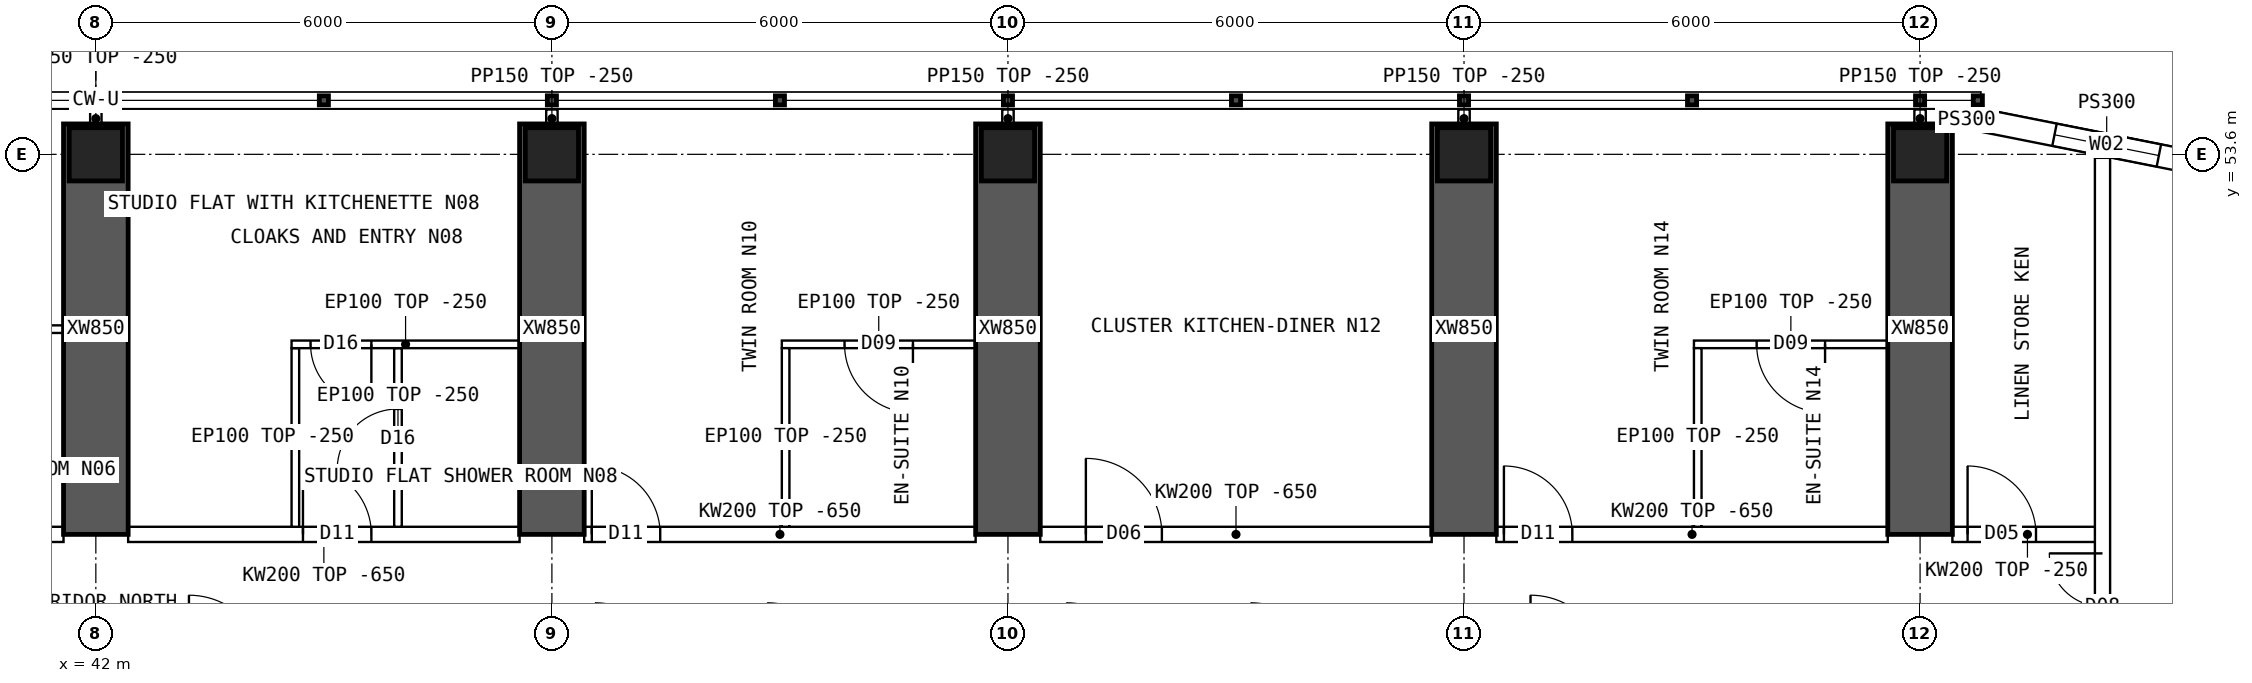
"""IFC4 building model, lengths in metres.
Left out: names, types, materials, properties, quantities, classifications, styles, units other than length and angle.
Written with IfcOpenShell. Run it as: python <this file> out.ifc"""

import sys

from ifc_helpers import new_model, si_unit, direction, frame, frame_2d, origin, origin_2d, place, context, subcontext, project, spatial, polyline, rectangle, hollow_rectangle, outline, extrude, element, fill, save


model = new_model("IFC4")
c1 = context("Model", 3, precision=1e-05, world=origin(), true_north=direction((0.0, 1.0)))
c2 = subcontext(c1, "Body", "Model", "MODEL_VIEW")
j1 = project(units=[si_unit("LENGTHUNIT", "METRE"), si_unit("PLANEANGLEUNIT", "RADIAN")], contexts=[c1])
p1 = place(None, origin())
s1 = spatial("IfcSite", under=j1, at=p1, CompositionType="ELEMENT")
p2 = place(p1, origin())
s2 = spatial("IfcBuilding", under=s1, at=p2, CompositionType="ELEMENT")
p3 = place(p2, frame((0.0, 0.0, 148.6)))
s3 = spatial("IfcBuildingStorey", under=s2, at=p3, CompositionType="ELEMENT", Elevation=148.6)
for number, where, z_axis, x_axis in (
    (1, (42.0, 53.6, 0.0), (0.0, 0.0, 1.0), (1.0, 0.0, 0.0)),
    (2, (48.0, 53.6, 0.0), (0.0, 0.0, 1.0), (1.0, 0.0, 0.0)),
    (3, (54.0, 53.6, 0.0), (0.0, 0.0, 1.0), (1.0, 0.0, 0.0)),
    (4, (60.0, 53.6, 0.0), (0.0, 0.0, 1.0), (1.0, 0.0, 0.0)),
    (5, (66.0, 53.6, 0.0), (0.0, 0.0, 1.0), (1.0, 0.0, 0.0)),
):
    element("IfcColumn", number, at=place(p3, frame(where, z_axis=z_axis, x_axis=x_axis)), inside=s3, PredefinedType="COLUMN", context=c2, shape_type="SweptSolid", body=[
        extrude(hollow_rectangle(XDim=0.7, YDim=0.7, WallThickness=0.07, at=origin_2d()), origin(), (0.0, 0.0, 1.0), 3.75),
    ])
for number, where, z_axis, x_axis in (
    (6, (42.0, 48.6, 0.0), (0.0, 0.0, 1.0), (0.0, 1.0, 0.0)),
    (7, (48.0, 48.6, 0.0), (0.0, 0.0, 1.0), (0.0, 1.0, 0.0)),
    (8, (54.0, 48.6, 0.0), (0.0, 0.0, 1.0), (0.0, 1.0, 0.0)),
    (9, (60.0, 48.6, 0.0), (0.0, 0.0, 1.0), (0.0, 1.0, 0.0)),
    (10, (66.0, 48.6, 0.0), (0.0, 0.0, 1.0), (0.0, 1.0, 0.0)),
):
    element("IfcWall", number, at=place(p3, frame(where, z_axis=z_axis, x_axis=x_axis)), inside=s3, PredefinedType="SHEAR", context=c2, shape_type="SweptSolid", body=[
        extrude(rectangle(XDim=5.4, YDim=0.85, at=frame_2d((2.7, 0.0))), origin(), (0.0, 0.0, 1.0), 3.75),
    ])
p4 = place(p3, frame((70.11, 53.392, 0.0), z_axis=(0.0, 0.0, 1.0), x_axis=(-0.98078325777, 0.195100490205, 0.0)))
e11 = element("IfcWall", 11, at=p4, inside=s3, PredefinedType="SOLIDWALL", context=c2, shape_type="SweptSolid", body=[
    extrude(outline(polyline([(-0.03, -0.15), (3.405, -0.15), (3.345, 0.15), (0.03, 0.15), (-0.03, -0.15)])), origin(), (0.0, 0.0, 1.0), 3.5),
])
p5 = place(p4, frame((0.988, 0.0, 0.9)))
e12 = element("IfcOpeningElement", 12, at=p5, cuts=e11, PredefinedType="OPENING", context=c2, shape_type="SweptSolid", body=[
    extrude(rectangle(XDim=1.4, YDim=1.8, at=frame_2d((0.7, 0.9))), frame((0.0, 0.16, 0.0), z_axis=(0.0, -1.0, 0.0), x_axis=(1.0, 0.0, 0.0)), (0.0, 0.0, 1.0), 0.32),
])
p6 = place(p3, frame((66.8, 54.05, 0.0), z_axis=(0.0, 0.0, 1.0), x_axis=(-1.0, 0.0, 0.0)))
e13 = element("IfcWall", 13, at=p6, inside=s3, PredefinedType="SOLIDWALL", context=c2, shape_type="SweptSolid", body=[
    extrude(rectangle(XDim=0.375, YDim=0.3, at=frame_2d((0.188, 0.0))), origin(), (0.0, 0.0, 1.0), 3.5),
])
p7 = place(p3, frame((36.425, 48.6, 0.0), z_axis=(0.0, 0.0, 1.0), x_axis=(1.0, 0.0, 0.0)))
e14 = element("IfcWall", 14, at=p7, inside=s3, PredefinedType="SOLIDWALL", context=c2, shape_type="SweptSolid", body=[
    extrude(outline(polyline([(0.0, 0.0), (5.15, 0.0), (5.15, 3.1), (0.0, 3.1), (0.0, 0.0)])), frame((0.0, 0.1, 0.0), z_axis=(0.0, -1.0, 0.0), x_axis=(1.0, 0.0, 0.0)), (0.0, 0.0, 1.0), 0.2),
])
p8 = place(p7, frame((0.3, 0.0, 0.0)))
e15 = element("IfcOpeningElement", 15, at=p8, cuts=e14, PredefinedType="OPENING", context=c2, shape_type="SweptSolid", body=[
    extrude(rectangle(XDim=1.0, YDim=2.1, at=frame_2d((0.5, 1.05))), frame((0.0, 0.11, 0.0), z_axis=(0.0, -1.0, 0.0), x_axis=(1.0, 0.0, 0.0)), (0.0, 0.0, 1.0), 0.22),
])
p9 = place(p3, frame((42.425, 48.6, 0.0), z_axis=(0.0, 0.0, 1.0), x_axis=(1.0, 0.0, 0.0)))
e16 = element("IfcWall", 16, at=p9, inside=s3, PredefinedType="SOLIDWALL", context=c2, shape_type="SweptSolid", body=[
    extrude(outline(polyline([(0.0, 0.0), (5.15, 0.0), (5.15, 3.1), (0.0, 3.1), (0.0, 0.0)])), frame((0.0, 0.1, 0.0), z_axis=(0.0, -1.0, 0.0), x_axis=(1.0, 0.0, 0.0)), (0.0, 0.0, 1.0), 0.2),
])
p10 = place(p9, frame((2.3, 0.0, 0.0)))
e17 = element("IfcOpeningElement", 17, at=p10, cuts=e16, PredefinedType="OPENING", context=c2, shape_type="SweptSolid", body=[
    extrude(rectangle(XDim=0.9, YDim=2.1, at=frame_2d((0.45, 1.05))), frame((0.0, 0.11, 0.0), z_axis=(0.0, -1.0, 0.0), x_axis=(1.0, 0.0, 0.0)), (0.0, 0.0, 1.0), 0.22),
])
p11 = place(p3, frame((48.425, 48.6, 0.0), z_axis=(0.0, 0.0, 1.0), x_axis=(1.0, 0.0, 0.0)))
e18 = element("IfcWall", 18, at=p11, inside=s3, PredefinedType="SOLIDWALL", context=c2, shape_type="SweptSolid", body=[
    extrude(outline(polyline([(0.0, 0.0), (5.15, 0.0), (5.15, 3.1), (0.0, 3.1), (0.0, 0.0)])), frame((0.0, 0.1, 0.0), z_axis=(0.0, -1.0, 0.0), x_axis=(1.0, 0.0, 0.0)), (0.0, 0.0, 1.0), 0.2),
])
p12 = place(p11, frame((0.1, 0.0, 0.0)))
e19 = element("IfcOpeningElement", 19, at=p12, cuts=e18, PredefinedType="OPENING", context=c2, shape_type="SweptSolid", body=[
    extrude(rectangle(XDim=0.9, YDim=2.1, at=frame_2d((0.45, 1.05))), frame((0.0, 0.11, 0.0), z_axis=(0.0, -1.0, 0.0), x_axis=(1.0, 0.0, 0.0)), (0.0, 0.0, 1.0), 0.22),
])
p13 = place(p3, frame((54.425, 48.6, 0.0), z_axis=(0.0, 0.0, 1.0), x_axis=(1.0, 0.0, 0.0)))
e20 = element("IfcWall", 20, at=p13, inside=s3, PredefinedType="SOLIDWALL", context=c2, shape_type="SweptSolid", body=[
    extrude(outline(polyline([(0.0, 0.0), (5.15, 0.0), (5.15, 3.1), (0.0, 3.1), (0.0, 0.0)])), frame((0.0, 0.1, 0.0), z_axis=(0.0, -1.0, 0.0), x_axis=(1.0, 0.0, 0.0)), (0.0, 0.0, 1.0), 0.2),
])
p14 = place(p13, frame((0.6, 0.0, 0.0)))
e21 = element("IfcOpeningElement", 21, at=p14, cuts=e20, PredefinedType="OPENING", context=c2, shape_type="SweptSolid", body=[
    extrude(rectangle(XDim=1.0, YDim=2.1, at=frame_2d((0.5, 1.05))), frame((0.0, 0.11, 0.0), z_axis=(0.0, -1.0, 0.0), x_axis=(1.0, 0.0, 0.0)), (0.0, 0.0, 1.0), 0.22),
])
p15 = place(p3, frame((60.425, 48.6, 0.0), z_axis=(0.0, 0.0, 1.0), x_axis=(1.0, 0.0, 0.0)))
e22 = element("IfcWall", 22, at=p15, inside=s3, PredefinedType="SOLIDWALL", context=c2, shape_type="SweptSolid", body=[
    extrude(outline(polyline([(0.0, 0.0), (5.15, 0.0), (5.15, 3.1), (0.0, 3.1), (0.0, 0.0)])), frame((0.0, 0.1, 0.0), z_axis=(0.0, -1.0, 0.0), x_axis=(1.0, 0.0, 0.0)), (0.0, 0.0, 1.0), 0.2),
])
p16 = place(p15, frame((0.1, 0.0, 0.0)))
e23 = element("IfcOpeningElement", 23, at=p16, cuts=e22, PredefinedType="OPENING", context=c2, shape_type="SweptSolid", body=[
    extrude(rectangle(XDim=0.9, YDim=2.1, at=frame_2d((0.45, 1.05))), frame((0.0, 0.11, 0.0), z_axis=(0.0, -1.0, 0.0), x_axis=(1.0, 0.0, 0.0)), (0.0, 0.0, 1.0), 0.22),
])
p17 = place(p3, frame((66.425, 48.6, 0.0), z_axis=(0.0, 0.0, 1.0), x_axis=(1.0, 0.0, 0.0)))
e24 = element("IfcWall", 24, at=p17, inside=s3, PredefinedType="SOLIDWALL", context=c2, shape_type="SweptSolid", body=[
    extrude(rectangle(XDim=1.975, YDim=0.2, at=frame_2d((0.987, 0.0))), origin(), (0.0, 0.0, 1.0), 3.5),
])
p18 = place(p17, frame((0.2, 0.0, 0.0)))
e25 = element("IfcOpeningElement", 25, at=p18, cuts=e24, PredefinedType="OPENING", context=c2, shape_type="SweptSolid", body=[
    extrude(rectangle(XDim=0.9, YDim=2.1, at=frame_2d((0.45, 1.05))), frame((0.0, 0.11, 0.0), z_axis=(0.0, -1.0, 0.0), x_axis=(1.0, 0.0, 0.0)), (0.0, 0.0, 1.0), 0.22),
])
p19 = place(p3, frame((38.925, 51.3, 0.0), z_axis=(0.0, 0.0, 1.0), x_axis=(1.0, 0.0, 0.0)))
e26 = element("IfcWall", 26, at=p19, inside=s3, PredefinedType="PARTITIONING", context=c2, shape_type="SweptSolid", body=[
    extrude(rectangle(XDim=2.65, YDim=0.1, at=frame_2d((1.325, 0.0))), origin(), (0.0, 0.0, 1.0), 3.5),
])
p20 = place(p3, frame((44.575, 51.1, 0.0), z_axis=(0.0, 0.0, 1.0), x_axis=(1.0, 0.0, 0.0)))
e27 = element("IfcWall", 27, at=p20, inside=s3, PredefinedType="PARTITIONING", context=c2, shape_type="SweptSolid", body=[
    extrude(rectangle(XDim=3.0, YDim=0.1, at=frame_2d((1.5, 0.0))), origin(), (0.0, 0.0, 1.0), 3.5),
])
p21 = place(p20, frame((0.25, 0.0, 0.0)))
e28 = element("IfcOpeningElement", 28, at=p21, cuts=e27, PredefinedType="OPENING", context=c2, shape_type="SweptSolid", body=[
    extrude(rectangle(XDim=0.8, YDim=2.1, at=frame_2d((0.4, 1.05))), frame((0.0, 0.06, 0.0), z_axis=(0.0, -1.0, 0.0), x_axis=(1.0, 0.0, 0.0)), (0.0, 0.0, 1.0), 0.12),
])
p22 = place(p3, frame((44.625, 51.05, 0.0), z_axis=(0.0, 0.0, 1.0), x_axis=(0.0, -1.0, 0.0)))
e29 = element("IfcWall", 29, at=p22, inside=s3, PredefinedType="PARTITIONING", context=c2, shape_type="SweptSolid", body=[
    extrude(outline(polyline([(0.0, 0.0), (2.35, 0.0), (2.35, 3.1), (2.302, 3.1), (2.3, 3.5), (0.0, 3.5), (0.0, 0.0)])), frame((0.0, 0.05, 0.0), z_axis=(0.0, -1.0, 0.0), x_axis=(1.0, 0.0, 0.0)), (0.0, 0.0, 1.0), 0.1),
])
p23 = place(p3, frame((45.975, 51.05, 0.0), z_axis=(0.0, 0.0, 1.0), x_axis=(0.0, -1.0, 0.0)))
e30 = element("IfcWall", 30, at=p23, inside=s3, PredefinedType="PARTITIONING", context=c2, shape_type="SweptSolid", body=[
    extrude(outline(polyline([(0.0, 0.0), (2.35, 0.0), (2.35, 3.1), (2.302, 3.1), (2.3, 3.5), (0.0, 3.5), (0.0, 0.0)])), frame((0.0, 0.05, 0.0), z_axis=(0.0, -1.0, 0.0), x_axis=(1.0, 0.0, 0.0)), (0.0, 0.0, 1.0), 0.1),
])
p24 = place(p23, frame((0.8, 0.0, 0.0)))
e31 = element("IfcOpeningElement", 31, at=p24, cuts=e30, PredefinedType="OPENING", context=c2, shape_type="SweptSolid", body=[
    extrude(rectangle(XDim=0.8, YDim=2.1, at=frame_2d((0.4, 1.05))), frame((0.0, 0.06, 0.0), z_axis=(0.0, -1.0, 0.0), x_axis=(1.0, 0.0, 0.0)), (0.0, 0.0, 1.0), 0.12),
])
p25 = place(p3, frame((51.025, 51.1, 0.0), z_axis=(0.0, 0.0, 1.0), x_axis=(1.0, 0.0, 0.0)))
e32 = element("IfcWall", 32, at=p25, inside=s3, PredefinedType="PARTITIONING", context=c2, shape_type="SweptSolid", body=[
    extrude(rectangle(XDim=2.55, YDim=0.1, at=frame_2d((1.275, 0.0))), origin(), (0.0, 0.0, 1.0), 3.5),
])
p26 = place(p25, frame((0.825, 0.0, 0.0)))
e33 = element("IfcOpeningElement", 33, at=p26, cuts=e32, PredefinedType="OPENING", context=c2, shape_type="SweptSolid", body=[
    extrude(rectangle(XDim=0.9, YDim=2.1, at=frame_2d((0.45, 1.05))), frame((0.0, 0.06, 0.0), z_axis=(0.0, -1.0, 0.0), x_axis=(1.0, 0.0, 0.0)), (0.0, 0.0, 1.0), 0.12),
])
p27 = place(p3, frame((51.075, 51.05, 0.0), z_axis=(0.0, 0.0, 1.0), x_axis=(0.0, -1.0, 0.0)))
e34 = element("IfcWall", 34, at=p27, inside=s3, PredefinedType="PARTITIONING", context=c2, shape_type="SweptSolid", body=[
    extrude(outline(polyline([(0.0, 0.0), (2.35, 0.0), (2.35, 3.1), (2.302, 3.1), (2.3, 3.5), (0.0, 3.5), (0.0, 0.0)])), frame((0.0, 0.05, 0.0), z_axis=(0.0, -1.0, 0.0), x_axis=(1.0, 0.0, 0.0)), (0.0, 0.0, 1.0), 0.1),
])
p28 = place(p3, frame((63.025, 51.1, 0.0), z_axis=(0.0, 0.0, 1.0), x_axis=(1.0, 0.0, 0.0)))
e35 = element("IfcWall", 35, at=p28, inside=s3, PredefinedType="PARTITIONING", context=c2, shape_type="SweptSolid", body=[
    extrude(rectangle(XDim=2.55, YDim=0.1, at=frame_2d((1.275, 0.0))), origin(), (0.0, 0.0, 1.0), 3.5),
])
p29 = place(p28, frame((0.825, 0.0, 0.0)))
e36 = element("IfcOpeningElement", 36, at=p29, cuts=e35, PredefinedType="OPENING", context=c2, shape_type="SweptSolid", body=[
    extrude(rectangle(XDim=0.9, YDim=2.1, at=frame_2d((0.45, 1.05))), frame((0.0, 0.06, 0.0), z_axis=(0.0, -1.0, 0.0), x_axis=(1.0, 0.0, 0.0)), (0.0, 0.0, 1.0), 0.12),
])
p30 = place(p3, frame((63.075, 51.05, 0.0), z_axis=(0.0, 0.0, 1.0), x_axis=(0.0, -1.0, 0.0)))
e37 = element("IfcWall", 37, at=p30, inside=s3, PredefinedType="PARTITIONING", context=c2, shape_type="SweptSolid", body=[
    extrude(outline(polyline([(0.0, 0.0), (2.35, 0.0), (2.35, 3.1), (2.302, 3.1), (2.3, 3.5), (0.0, 3.5), (0.0, 0.0)])), frame((0.0, 0.05, 0.0), z_axis=(0.0, -1.0, 0.0), x_axis=(1.0, 0.0, 0.0)), (0.0, 0.0, 1.0), 0.1),
])
p31 = place(p3, frame((68.4, 10.446, 0.0), z_axis=(0.0, 0.0, 1.0), x_axis=(0.0, 1.0, 0.0)))
e38 = element("IfcWall", 38, at=p31, inside=s3, PredefinedType="SOLIDWALL", context=c2, shape_type="SweptSolid", body=[
    extrude(rectangle(XDim=43.107, YDim=0.2, at=frame_2d((21.554, 0.0))), origin(), (0.0, 0.0, 1.0), 3.5),
])
p32 = place(p31, frame((27.994, 0.0, 0.0)))
e39 = element("IfcOpeningElement", 39, at=p32, cuts=e38, PredefinedType="OPENING", context=c2, shape_type="SweptSolid", body=[
    extrude(rectangle(XDim=1.2, YDim=2.1, at=frame_2d((0.6, 1.05))), frame((0.0, 0.11, 0.0), z_axis=(0.0, -1.0, 0.0), x_axis=(1.0, 0.0, 0.0)), (0.0, 0.0, 1.0), 0.22),
])
p33 = place(p31, frame((5.104, 0.0, 0.0)))
e40 = element("IfcOpeningElement", 40, at=p33, cuts=e38, PredefinedType="OPENING", context=c2, shape_type="SweptSolid", body=[
    extrude(rectangle(XDim=1.4, YDim=2.1, at=frame_2d((0.7, 1.05))), frame((0.0, 0.11, 0.0), z_axis=(0.0, -1.0, 0.0), x_axis=(1.0, 0.0, 0.0)), (0.0, 0.0, 1.0), 0.22),
])
p34 = place(p31, frame((36.504, 0.0, 0.0)))
e41 = element("IfcOpeningElement", 41, at=p34, cuts=e38, PredefinedType="OPENING", context=c2, shape_type="SweptSolid", body=[
    extrude(rectangle(XDim=1.4, YDim=2.1, at=frame_2d((0.7, 1.05))), frame((0.0, 0.11, 0.0), z_axis=(0.0, -1.0, 0.0), x_axis=(1.0, 0.0, 0.0)), (0.0, 0.0, 1.0), 0.22),
])
for number, where, z_axis, x_axis in (
    (42, (42.0, 53.95, 0.0), (0.0, 0.0, 1.0), (0.0, 1.0, 0.0)),
    (43, (48.0, 53.95, 0.0), (0.0, 0.0, 1.0), (0.0, 1.0, 0.0)),
    (44, (54.0, 53.95, 0.0), (0.0, 0.0, 1.0), (0.0, 1.0, 0.0)),
    (45, (60.0, 53.95, 0.0), (0.0, 0.0, 1.0), (0.0, 1.0, 0.0)),
    (46, (66.0, 53.95, 0.0), (0.0, 0.0, 1.0), (0.0, 1.0, 0.0)),
):
    element("IfcWall", number, at=place(p3, frame(where, z_axis=z_axis, x_axis=x_axis)), inside=s3, PredefinedType="PARTITIONING", context=c2, shape_type="SweptSolid", body=[
        extrude(rectangle(XDim=0.24, YDim=0.15, at=frame_2d((0.12, 0.0))), origin(), (0.0, 0.0, 1.0), 3.5),
    ])
p35 = place(p5, origin())
e47 = element("IfcWindow", 47, at=p35, inside=s3, PartitioningType="SINGLE_PANEL", PredefinedType="WINDOW", context=c2, shape_type="SweptSolid", body=[
    extrude(rectangle(XDim=1.4, YDim=1.8, at=frame_2d((0.7, 0.9))), frame((0.0, 0.03, 0.0), z_axis=(0.0, -1.0, 0.0), x_axis=(1.0, 0.0, 0.0)), (0.0, 0.0, 1.0), 0.06),
])
fill(e12, e47)
p36 = place(p21, origin())
e48 = element("IfcDoor", 48, at=p36, inside=s3, OperationType="SINGLE_SWING_RIGHT", PredefinedType="DOOR", context=c2, shape_type="SweptSolid", body=[
    extrude(rectangle(XDim=0.8, YDim=2.1, at=frame_2d((0.4, 1.05))), frame((0.0, 0.025, 0.0), z_axis=(0.0, -1.0, 0.0), x_axis=(1.0, 0.0, 0.0)), (0.0, 0.0, 1.0), 0.05),
])
fill(e28, e48)
p37 = place(p24, origin())
e49 = element("IfcDoor", 49, at=p37, inside=s3, OperationType="SINGLE_SWING_RIGHT", PredefinedType="DOOR", context=c2, shape_type="SweptSolid", body=[
    extrude(rectangle(XDim=0.8, YDim=2.1, at=frame_2d((0.4, 1.05))), frame((0.0, 0.025, 0.0), z_axis=(0.0, -1.0, 0.0), x_axis=(1.0, 0.0, 0.0)), (0.0, 0.0, 1.0), 0.05),
])
fill(e31, e49)
p38 = place(p10, origin())
e50 = element("IfcDoor", 50, at=p38, inside=s3, OperationType="SINGLE_SWING_LEFT", PredefinedType="DOOR", context=c2, shape_type="SweptSolid", body=[
    extrude(rectangle(XDim=0.9, YDim=2.1, at=frame_2d((0.45, 1.05))), frame((0.0, 0.025, 0.0), z_axis=(0.0, -1.0, 0.0), x_axis=(1.0, 0.0, 0.0)), (0.0, 0.0, 1.0), 0.05),
])
fill(e17, e50)
p39 = place(p26, origin())
e51 = element("IfcDoor", 51, at=p39, inside=s3, OperationType="SINGLE_SWING_RIGHT", PredefinedType="DOOR", context=c2, shape_type="SweptSolid", body=[
    extrude(rectangle(XDim=0.9, YDim=2.1, at=frame_2d((0.45, 1.05))), frame((0.0, 0.025, 0.0), z_axis=(0.0, -1.0, 0.0), x_axis=(1.0, 0.0, 0.0)), (0.0, 0.0, 1.0), 0.05),
])
fill(e33, e51)
p40 = place(p12, origin())
e52 = element("IfcDoor", 52, at=p40, inside=s3, OperationType="SINGLE_SWING_LEFT", PredefinedType="DOOR", context=c2, shape_type="SweptSolid", body=[
    extrude(rectangle(XDim=0.9, YDim=2.1, at=frame_2d((0.45, 1.05))), frame((0.0, 0.025, 0.0), z_axis=(0.0, -1.0, 0.0), x_axis=(1.0, 0.0, 0.0)), (0.0, 0.0, 1.0), 0.05),
])
fill(e19, e52)
p41 = place(p14, origin())
e53 = element("IfcDoor", 53, at=p41, inside=s3, OperationType="SINGLE_SWING_LEFT", PredefinedType="DOOR", context=c2, shape_type="SweptSolid", body=[
    extrude(rectangle(XDim=1.0, YDim=2.1, at=frame_2d((0.5, 1.05))), frame((0.0, 0.025, 0.0), z_axis=(0.0, -1.0, 0.0), x_axis=(1.0, 0.0, 0.0)), (0.0, 0.0, 1.0), 0.05),
])
fill(e21, e53)
p42 = place(p29, origin())
e54 = element("IfcDoor", 54, at=p42, inside=s3, OperationType="SINGLE_SWING_RIGHT", PredefinedType="DOOR", context=c2, shape_type="SweptSolid", body=[
    extrude(rectangle(XDim=0.9, YDim=2.1, at=frame_2d((0.45, 1.05))), frame((0.0, 0.025, 0.0), z_axis=(0.0, -1.0, 0.0), x_axis=(1.0, 0.0, 0.0)), (0.0, 0.0, 1.0), 0.05),
])
fill(e36, e54)
p43 = place(p16, origin())
e55 = element("IfcDoor", 55, at=p43, inside=s3, OperationType="SINGLE_SWING_LEFT", PredefinedType="DOOR", context=c2, shape_type="SweptSolid", body=[
    extrude(rectangle(XDim=0.9, YDim=2.1, at=frame_2d((0.45, 1.05))), frame((0.0, 0.025, 0.0), z_axis=(0.0, -1.0, 0.0), x_axis=(1.0, 0.0, 0.0)), (0.0, 0.0, 1.0), 0.05),
])
fill(e23, e55)
p44 = place(p34, origin())
e56 = element("IfcDoor", 56, at=p44, inside=s3, OperationType="DOUBLE_DOOR_SINGLE_SWING", PredefinedType="DOOR", context=c2, shape_type="SweptSolid", body=[
    extrude(rectangle(XDim=1.4, YDim=2.1, at=frame_2d((0.7, 1.05))), frame((0.0, 0.025, 0.0), z_axis=(0.0, -1.0, 0.0), x_axis=(1.0, 0.0, 0.0)), (0.0, 0.0, 1.0), 0.05),
])
fill(e41, e56)
p45 = place(p18, origin())
e57 = element("IfcDoor", 57, at=p45, inside=s3, OperationType="SINGLE_SWING_LEFT", PredefinedType="DOOR", context=c2, shape_type="SweptSolid", body=[
    extrude(rectangle(XDim=0.9, YDim=2.1, at=frame_2d((0.45, 1.05))), frame((0.0, 0.025, 0.0), z_axis=(0.0, -1.0, 0.0), x_axis=(1.0, 0.0, 0.0)), (0.0, 0.0, 1.0), 0.05),
])
fill(e25, e57)
save(model, sys.argv[1])
